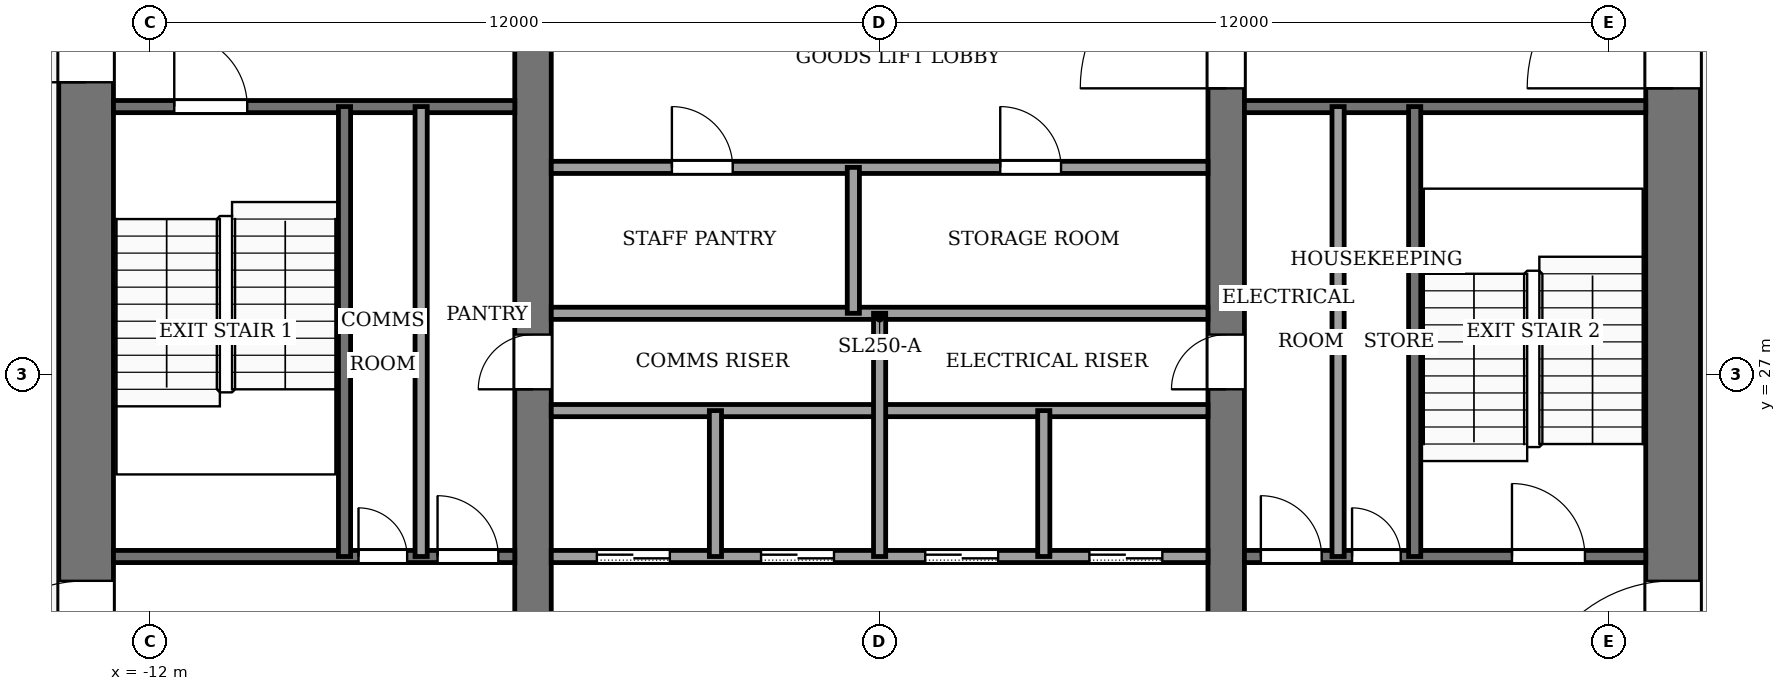
"""IFC4 building model, lengths in metres.
Left out: names, types, materials, properties, quantities, classifications, styles, units other than length and angle.
Written with IfcOpenShell. Run it as: python <this file> out.ifc"""

import sys

from ifc_helpers import new_model, si_unit, direction, frame, frame_2d, origin, place, context, subcontext, project, spatial, rectangle, extrude, element, fill, save


model = new_model("IFC4")
c1 = context("Model", 3, precision=1e-05, world=origin(), true_north=direction((0.0, 1.0)))
c2 = subcontext(c1, "Body", "Model", "MODEL_VIEW")
j1 = project(units=[si_unit("LENGTHUNIT", "METRE"), si_unit("PLANEANGLEUNIT", "RADIAN")], contexts=[c1])
p1 = place(None, origin())
s1 = spatial("IfcSite", under=j1, at=p1, CompositionType="ELEMENT")
p2 = place(p1, origin())
s2 = spatial("IfcBuilding", under=s1, at=p2, CompositionType="ELEMENT")
p3 = place(p2, frame((0.0, 0.0, 202.0)))
s3 = spatial("IfcBuildingStorey", under=s2, at=p3, CompositionType="ELEMENT", Elevation=202.0)
p4 = place(p3, frame((-13.05, 18.4, -0.13), z_axis=(0.0, 0.0, 1.0), x_axis=(0.0, 1.0, 0.0)))
e1 = element("IfcWall", 1, at=p4, inside=s3, PredefinedType="SHEAR", context=c2, shape_type="SweptSolid", body=[
    extrude(rectangle(XDim=19.2, YDim=0.9, at=frame_2d((9.6, 0.0))), origin(), (0.0, 0.0, 1.0), 4.0),
])
p5 = place(p4, frame((2.8, 0.0, 0.13)))
e2 = element("IfcOpeningElement", 2, at=p5, cuts=e1, PredefinedType="OPENING", context=c2, shape_type="SweptSolid", body=[
    extrude(rectangle(XDim=2.4, YDim=2.4, at=frame_2d((1.2, 1.2))), frame((0.0, 0.46, 0.0), z_axis=(0.0, -1.0, 0.0), x_axis=(1.0, 0.0, 0.0)), (0.0, 0.0, 1.0), 0.92),
])
p6 = place(p4, frame((13.4, 0.0, 0.13)))
e3 = element("IfcOpeningElement", 3, at=p6, cuts=e1, PredefinedType="OPENING", context=c2, shape_type="SweptSolid", body=[
    extrude(rectangle(XDim=1.4, YDim=2.2, at=frame_2d((0.7, 1.1))), frame((0.0, 0.46, 0.0), z_axis=(0.0, -1.0, 0.0), x_axis=(1.0, 0.0, 0.0)), (0.0, 0.0, 1.0), 0.92),
])
p7 = place(p3, frame((13.05, 18.4, -0.13), z_axis=(0.0, 0.0, 1.0), x_axis=(0.0, 1.0, 0.0)))
e4 = element("IfcWall", 4, at=p7, inside=s3, PredefinedType="SHEAR", context=c2, shape_type="SweptSolid", body=[
    extrude(rectangle(XDim=19.2, YDim=0.9, at=frame_2d((9.6, 0.0))), origin(), (0.0, 0.0, 1.0), 4.0),
])
p8 = place(p7, frame((2.8, 0.0, 0.13)))
e5 = element("IfcOpeningElement", 5, at=p8, cuts=e4, PredefinedType="OPENING", context=c2, shape_type="SweptSolid", body=[
    extrude(rectangle(XDim=2.4, YDim=2.4, at=frame_2d((1.2, 1.2))), frame((0.0, 0.46, 0.0), z_axis=(0.0, -1.0, 0.0), x_axis=(1.0, 0.0, 0.0)), (0.0, 0.0, 1.0), 0.92),
])
p9 = place(p7, frame((13.3, 0.0, 0.13)))
e6 = element("IfcOpeningElement", 6, at=p9, cuts=e4, PredefinedType="OPENING", context=c2, shape_type="SweptSolid", body=[
    extrude(rectangle(XDim=2.4, YDim=2.4, at=frame_2d((1.2, 1.2))), frame((0.0, 0.46, 0.0), z_axis=(0.0, -1.0, 0.0), x_axis=(1.0, 0.0, 0.0)), (0.0, 0.0, 1.0), 0.92),
])
p10 = place(p3, frame((-5.7, 18.4, -0.13), z_axis=(0.0, 0.0, 1.0), x_axis=(0.0, 1.0, 0.0)))
e7 = element("IfcWall", 7, at=p10, inside=s3, PredefinedType="SHEAR", context=c2, shape_type="SweptSolid", body=[
    extrude(rectangle(XDim=19.2, YDim=0.6, at=frame_2d((9.6, 0.0))), origin(), (0.0, 0.0, 1.0), 4.0),
])
p11 = place(p10, frame((8.35, 0.0, 0.13)))
e8 = element("IfcOpeningElement", 8, at=p11, cuts=e7, PredefinedType="OPENING", context=c2, shape_type="SweptSolid", body=[
    extrude(rectangle(XDim=0.9, YDim=2.1, at=frame_2d((0.45, 1.05))), frame((0.0, 0.31, 0.0), z_axis=(0.0, -1.0, 0.0), x_axis=(1.0, 0.0, 0.0)), (0.0, 0.0, 1.0), 0.62),
])
p12 = place(p3, frame((5.7, 18.4, -0.13), z_axis=(0.0, 0.0, 1.0), x_axis=(0.0, 1.0, 0.0)))
e9 = element("IfcWall", 9, at=p12, inside=s3, PredefinedType="SHEAR", context=c2, shape_type="SweptSolid", body=[
    extrude(rectangle(XDim=19.2, YDim=0.6, at=frame_2d((9.6, 0.0))), origin(), (0.0, 0.0, 1.0), 4.0),
])
p13 = place(p12, frame((8.35, 0.0, 0.13)))
e10 = element("IfcOpeningElement", 10, at=p13, cuts=e9, PredefinedType="OPENING", context=c2, shape_type="SweptSolid", body=[
    extrude(rectangle(XDim=0.9, YDim=2.1, at=frame_2d((0.45, 1.05))), frame((0.0, 0.31, 0.0), z_axis=(0.0, -1.0, 0.0), x_axis=(1.0, 0.0, 0.0)), (0.0, 0.0, 1.0), 0.62),
])
p14 = place(p12, frame((13.3, 0.0, 0.13)))
e11 = element("IfcOpeningElement", 11, at=p14, cuts=e9, PredefinedType="OPENING", context=c2, shape_type="SweptSolid", body=[
    extrude(rectangle(XDim=2.4, YDim=2.4, at=frame_2d((1.2, 1.2))), frame((0.0, 0.31, 0.0), z_axis=(0.0, -1.0, 0.0), x_axis=(1.0, 0.0, 0.0)), (0.0, 0.0, 1.0), 0.62),
])
p15 = place(p3, frame((-12.6, 24.0, 0.0), z_axis=(0.0, 0.0, 1.0), x_axis=(1.0, 0.0, 0.0)))
e12 = element("IfcWall", 12, at=p15, inside=s3, PredefinedType="PARTITIONING", context=c2, shape_type="SweptSolid", body=[
    extrude(rectangle(XDim=6.6, YDim=0.2, at=frame_2d((3.3, 0.0))), origin(), (0.0, 0.0, 1.0), 3.87),
])
p16 = place(p15, frame((4.03, 0.0, 0.0)))
e13 = element("IfcOpeningElement", 13, at=p16, cuts=e12, PredefinedType="OPENING", context=c2, shape_type="SweptSolid", body=[
    extrude(rectangle(XDim=0.8, YDim=2.1, at=frame_2d((0.4, 1.05))), frame((0.0, 0.11, 0.0), z_axis=(0.0, -1.0, 0.0), x_axis=(1.0, 0.0, 0.0)), (0.0, 0.0, 1.0), 0.22),
])
p17 = place(p15, frame((5.33, 0.0, 0.0)))
e14 = element("IfcOpeningElement", 14, at=p17, cuts=e12, PredefinedType="OPENING", context=c2, shape_type="SweptSolid", body=[
    extrude(rectangle(XDim=1.0, YDim=2.1, at=frame_2d((0.5, 1.05))), frame((0.0, 0.11, 0.0), z_axis=(0.0, -1.0, 0.0), x_axis=(1.0, 0.0, 0.0)), (0.0, 0.0, 1.0), 0.22),
])
p18 = place(p3, frame((-5.4, 24.0, 0.0), z_axis=(0.0, 0.0, 1.0), x_axis=(1.0, 0.0, 0.0)))
e15 = element("IfcWall", 15, at=p18, inside=s3, PredefinedType="PARTITIONING", context=c2, shape_type="SweptSolid", body=[
    extrude(rectangle(XDim=10.8, YDim=0.2, at=frame_2d((5.4, 0.0))), origin(), (0.0, 0.0, 1.0), 3.87),
])
p19 = place(p18, frame((0.75, 0.0, 0.0)))
e16 = element("IfcOpeningElement", 16, at=p19, cuts=e15, PredefinedType="OPENING", context=c2, shape_type="SweptSolid", body=[
    extrude(rectangle(XDim=1.2, YDim=2.2, at=frame_2d((0.6, 1.1))), frame((0.0, 0.11, 0.0), z_axis=(0.0, -1.0, 0.0), x_axis=(1.0, 0.0, 0.0)), (0.0, 0.0, 1.0), 0.22),
])
p20 = place(p18, frame((3.45, 0.0, 0.0)))
e17 = element("IfcOpeningElement", 17, at=p20, cuts=e15, PredefinedType="OPENING", context=c2, shape_type="SweptSolid", body=[
    extrude(rectangle(XDim=1.2, YDim=2.2, at=frame_2d((0.6, 1.1))), frame((0.0, 0.11, 0.0), z_axis=(0.0, -1.0, 0.0), x_axis=(1.0, 0.0, 0.0)), (0.0, 0.0, 1.0), 0.22),
])
p21 = place(p18, frame((6.15, 0.0, 0.0)))
e18 = element("IfcOpeningElement", 18, at=p21, cuts=e15, PredefinedType="OPENING", context=c2, shape_type="SweptSolid", body=[
    extrude(rectangle(XDim=1.2, YDim=2.2, at=frame_2d((0.6, 1.1))), frame((0.0, 0.11, 0.0), z_axis=(0.0, -1.0, 0.0), x_axis=(1.0, 0.0, 0.0)), (0.0, 0.0, 1.0), 0.22),
])
p22 = place(p18, frame((8.85, 0.0, 0.0)))
e19 = element("IfcOpeningElement", 19, at=p22, cuts=e15, PredefinedType="OPENING", context=c2, shape_type="SweptSolid", body=[
    extrude(rectangle(XDim=1.2, YDim=2.2, at=frame_2d((0.6, 1.1))), frame((0.0, 0.11, 0.0), z_axis=(0.0, -1.0, 0.0), x_axis=(1.0, 0.0, 0.0)), (0.0, 0.0, 1.0), 0.22),
])
p23 = place(p3, frame((6.0, 24.0, 0.0), z_axis=(0.0, 0.0, 1.0), x_axis=(1.0, 0.0, 0.0)))
e20 = element("IfcWall", 20, at=p23, inside=s3, PredefinedType="PARTITIONING", context=c2, shape_type="SweptSolid", body=[
    extrude(rectangle(XDim=6.6, YDim=0.2, at=frame_2d((3.3, 0.0))), origin(), (0.0, 0.0, 1.0), 3.87),
])
p24 = place(p23, frame((0.27, 0.0, 0.0)))
e21 = element("IfcOpeningElement", 21, at=p24, cuts=e20, PredefinedType="OPENING", context=c2, shape_type="SweptSolid", body=[
    extrude(rectangle(XDim=1.0, YDim=2.1, at=frame_2d((0.5, 1.05))), frame((0.0, 0.11, 0.0), z_axis=(0.0, -1.0, 0.0), x_axis=(1.0, 0.0, 0.0)), (0.0, 0.0, 1.0), 0.22),
])
p25 = place(p23, frame((1.77, 0.0, 0.0)))
e22 = element("IfcOpeningElement", 22, at=p25, cuts=e20, PredefinedType="OPENING", context=c2, shape_type="SweptSolid", body=[
    extrude(rectangle(XDim=0.8, YDim=2.1, at=frame_2d((0.4, 1.05))), frame((0.0, 0.11, 0.0), z_axis=(0.0, -1.0, 0.0), x_axis=(1.0, 0.0, 0.0)), (0.0, 0.0, 1.0), 0.22),
])
p26 = place(p23, frame((4.4, 0.0, 0.0)))
e23 = element("IfcOpeningElement", 23, at=p26, cuts=e20, PredefinedType="OPENING", context=c2, shape_type="SweptSolid", body=[
    extrude(rectangle(XDim=1.2, YDim=2.2, at=frame_2d((0.6, 1.1))), frame((0.0, 0.11, 0.0), z_axis=(0.0, -1.0, 0.0), x_axis=(1.0, 0.0, 0.0)), (0.0, 0.0, 1.0), 0.22),
])
for number, where, z_axis, x_axis in (
    (24, (-5.4, 26.4, 0.0), (0.0, 0.0, 1.0), (1.0, 0.0, 0.0)),
    (25, (-5.4, 28.0, 0.0), (0.0, 0.0, 1.0), (1.0, 0.0, 0.0)),
):
    element("IfcWall", number, at=place(p3, frame(where, z_axis=z_axis, x_axis=x_axis)), inside=s3, PredefinedType="PARTITIONING", context=c2, shape_type="SweptSolid", body=[
        extrude(rectangle(XDim=10.8, YDim=0.2, at=frame_2d((5.4, 0.0))), origin(), (0.0, 0.0, 1.0), 3.87),
    ])
p27 = place(p3, frame((-5.4, 30.4, 0.0), z_axis=(0.0, 0.0, 1.0), x_axis=(1.0, 0.0, 0.0)))
e26 = element("IfcWall", 26, at=p27, inside=s3, PredefinedType="PARTITIONING", context=c2, shape_type="SweptSolid", body=[
    extrude(rectangle(XDim=10.8, YDim=0.2, at=frame_2d((5.4, 0.0))), origin(), (0.0, 0.0, 1.0), 3.87),
])
p28 = place(p27, frame((1.984, 0.0, 0.0)))
e27 = element("IfcOpeningElement", 27, at=p28, cuts=e26, PredefinedType="OPENING", context=c2, shape_type="SweptSolid", body=[
    extrude(rectangle(XDim=1.0, YDim=2.1, at=frame_2d((0.5, 1.05))), frame((0.0, 0.11, 0.0), z_axis=(0.0, -1.0, 0.0), x_axis=(1.0, 0.0, 0.0)), (0.0, 0.0, 1.0), 0.22),
])
p29 = place(p27, frame((7.384, 0.0, 0.0)))
e28 = element("IfcOpeningElement", 28, at=p29, cuts=e26, PredefinedType="OPENING", context=c2, shape_type="SweptSolid", body=[
    extrude(rectangle(XDim=1.0, YDim=2.1, at=frame_2d((0.5, 1.05))), frame((0.0, 0.11, 0.0), z_axis=(0.0, -1.0, 0.0), x_axis=(1.0, 0.0, 0.0)), (0.0, 0.0, 1.0), 0.22),
])
p30 = place(p3, frame((-12.6, 31.4, 0.0), z_axis=(0.0, 0.0, 1.0), x_axis=(1.0, 0.0, 0.0)))
e29 = element("IfcWall", 29, at=p30, inside=s3, PredefinedType="PARTITIONING", context=c2, shape_type="SweptSolid", body=[
    extrude(rectangle(XDim=6.6, YDim=0.2, at=frame_2d((3.3, 0.0))), origin(), (0.0, 0.0, 1.0), 3.87),
])
p31 = place(p30, frame((1.0, 0.0, 0.0)))
e30 = element("IfcOpeningElement", 30, at=p31, cuts=e29, PredefinedType="OPENING", context=c2, shape_type="SweptSolid", body=[
    extrude(rectangle(XDim=1.2, YDim=2.2, at=frame_2d((0.6, 1.1))), frame((0.0, 0.11, 0.0), z_axis=(0.0, -1.0, 0.0), x_axis=(1.0, 0.0, 0.0)), (0.0, 0.0, 1.0), 0.22),
])
p32 = place(p3, frame((6.0, 31.4, 0.0), z_axis=(0.0, 0.0, 1.0), x_axis=(1.0, 0.0, 0.0)))
e31 = element("IfcWall", 31, at=p32, inside=s3, PredefinedType="PARTITIONING", context=c2, shape_type="SweptSolid", body=[
    extrude(rectangle(XDim=6.6, YDim=0.2, at=frame_2d((3.3, 0.0))), origin(), (0.0, 0.0, 1.0), 3.87),
])
for number, where, z_axis, x_axis in (
    (32, (-8.8, 24.0, 0.0), (0.0, 0.0, 1.0), (0.0, 1.0, 0.0)),
    (33, (-7.54, 24.0, 0.0), (0.0, 0.0, 1.0), (0.0, 1.0, 0.0)),
):
    element("IfcWall", number, at=place(p3, frame(where, z_axis=z_axis, x_axis=x_axis)), inside=s3, PredefinedType="PARTITIONING", context=c2, shape_type="SweptSolid", body=[
        extrude(rectangle(XDim=7.4, YDim=0.2, at=frame_2d((3.7, 0.0))), origin(), (0.0, 0.0, 1.0), 3.87),
    ])
for number, where, z_axis, x_axis in (
    (34, (-2.7, 24.0, 0.0), (0.0, 0.0, 1.0), (0.0, 1.0, 0.0)),
    (35, (-0.432, 28.0, 0.0), (0.0, 0.0, 1.0), (0.0, 1.0, 0.0)),
):
    element("IfcWall", number, at=place(p3, frame(where, z_axis=z_axis, x_axis=x_axis)), inside=s3, PredefinedType="PARTITIONING", context=c2, shape_type="SweptSolid", body=[
        extrude(rectangle(XDim=2.4, YDim=0.2, at=frame_2d((1.2, 0.0))), origin(), (0.0, 0.0, 1.0), 3.87),
    ])
p33 = place(p3, frame((0.0, 24.0, 0.0), z_axis=(0.0, 0.0, 1.0), x_axis=(0.0, 1.0, 0.0)))
e36 = element("IfcWall", 36, at=p33, inside=s3, PredefinedType="PARTITIONING", context=c2, shape_type="SweptSolid", body=[
    extrude(rectangle(XDim=4.0, YDim=0.2, at=frame_2d((2.0, 0.0))), origin(), (0.0, 0.0, 1.0), 3.87),
])
p34 = place(p3, frame((2.7, 24.0, 0.0), z_axis=(0.0, 0.0, 1.0), x_axis=(0.0, 1.0, 0.0)))
e37 = element("IfcWall", 37, at=p34, inside=s3, PredefinedType="PARTITIONING", context=c2, shape_type="SweptSolid", body=[
    extrude(rectangle(XDim=2.4, YDim=0.2, at=frame_2d((1.2, 0.0))), origin(), (0.0, 0.0, 1.0), 3.87),
])
for number, where, z_axis, x_axis in (
    (38, (7.54, 24.0, 0.0), (0.0, 0.0, 1.0), (0.0, 1.0, 0.0)),
    (39, (8.8, 24.0, 0.0), (0.0, 0.0, 1.0), (0.0, 1.0, 0.0)),
):
    element("IfcWall", number, at=place(p3, frame(where, z_axis=z_axis, x_axis=x_axis)), inside=s3, PredefinedType="PARTITIONING", context=c2, shape_type="SweptSolid", body=[
        extrude(rectangle(XDim=7.4, YDim=0.2, at=frame_2d((3.7, 0.0))), origin(), (0.0, 0.0, 1.0), 3.87),
    ])
p35 = place(p19, origin())
e40 = element("IfcDoor", 40, at=p35, inside=s3, OperationType="SLIDING_TO_LEFT", PredefinedType="DOOR", context=c2, shape_type="SweptSolid", body=[
    extrude(rectangle(XDim=1.2, YDim=2.2, at=frame_2d((0.6, 1.1))), frame((0.0, 0.025, 0.0), z_axis=(0.0, -1.0, 0.0), x_axis=(1.0, 0.0, 0.0)), (0.0, 0.0, 1.0), 0.05),
])
fill(e16, e40)
p36 = place(p20, origin())
e41 = element("IfcDoor", 41, at=p36, inside=s3, OperationType="SLIDING_TO_LEFT", PredefinedType="DOOR", context=c2, shape_type="SweptSolid", body=[
    extrude(rectangle(XDim=1.2, YDim=2.2, at=frame_2d((0.6, 1.1))), frame((0.0, 0.025, 0.0), z_axis=(0.0, -1.0, 0.0), x_axis=(1.0, 0.0, 0.0)), (0.0, 0.0, 1.0), 0.05),
])
fill(e17, e41)
p37 = place(p21, origin())
e42 = element("IfcDoor", 42, at=p37, inside=s3, OperationType="SLIDING_TO_LEFT", PredefinedType="DOOR", context=c2, shape_type="SweptSolid", body=[
    extrude(rectangle(XDim=1.2, YDim=2.2, at=frame_2d((0.6, 1.1))), frame((0.0, 0.025, 0.0), z_axis=(0.0, -1.0, 0.0), x_axis=(1.0, 0.0, 0.0)), (0.0, 0.0, 1.0), 0.05),
])
fill(e18, e42)
p38 = place(p22, origin())
e43 = element("IfcDoor", 43, at=p38, inside=s3, OperationType="SLIDING_TO_LEFT", PredefinedType="DOOR", context=c2, shape_type="SweptSolid", body=[
    extrude(rectangle(XDim=1.2, YDim=2.2, at=frame_2d((0.6, 1.1))), frame((0.0, 0.025, 0.0), z_axis=(0.0, -1.0, 0.0), x_axis=(1.0, 0.0, 0.0)), (0.0, 0.0, 1.0), 0.05),
])
fill(e19, e43)
p39 = place(p28, origin())
e44 = element("IfcDoor", 44, at=p39, inside=s3, OperationType="SINGLE_SWING_LEFT", PredefinedType="DOOR", context=c2, shape_type="SweptSolid", body=[
    extrude(rectangle(XDim=1.0, YDim=2.1, at=frame_2d((0.5, 1.05))), frame((0.0, 0.025, 0.0), z_axis=(0.0, -1.0, 0.0), x_axis=(1.0, 0.0, 0.0)), (0.0, 0.0, 1.0), 0.05),
])
fill(e27, e44)
p40 = place(p29, origin())
e45 = element("IfcDoor", 45, at=p40, inside=s3, OperationType="SINGLE_SWING_RIGHT", PredefinedType="DOOR", context=c2, shape_type="SweptSolid", body=[
    extrude(rectangle(XDim=1.0, YDim=2.1, at=frame_2d((0.5, 1.05))), frame((0.0, 0.025, 0.0), z_axis=(0.0, -1.0, 0.0), x_axis=(1.0, 0.0, 0.0)), (0.0, 0.0, 1.0), 0.05),
])
fill(e28, e45)
p41 = place(p16, origin())
e46 = element("IfcDoor", 46, at=p41, inside=s3, OperationType="SINGLE_SWING_RIGHT", PredefinedType="DOOR", context=c2, shape_type="SweptSolid", body=[
    extrude(rectangle(XDim=0.8, YDim=2.1, at=frame_2d((0.4, 1.05))), frame((0.0, 0.025, 0.0), z_axis=(0.0, -1.0, 0.0), x_axis=(1.0, 0.0, 0.0)), (0.0, 0.0, 1.0), 0.05),
])
fill(e13, e46)
p42 = place(p17, origin())
e47 = element("IfcDoor", 47, at=p42, inside=s3, OperationType="SINGLE_SWING_LEFT", PredefinedType="DOOR", context=c2, shape_type="SweptSolid", body=[
    extrude(rectangle(XDim=1.0, YDim=2.1, at=frame_2d((0.5, 1.05))), frame((0.0, 0.025, 0.0), z_axis=(0.0, -1.0, 0.0), x_axis=(1.0, 0.0, 0.0)), (0.0, 0.0, 1.0), 0.05),
])
fill(e14, e47)
p43 = place(p24, origin())
e48 = element("IfcDoor", 48, at=p43, inside=s3, OperationType="SINGLE_SWING_RIGHT", PredefinedType="DOOR", context=c2, shape_type="SweptSolid", body=[
    extrude(rectangle(XDim=1.0, YDim=2.1, at=frame_2d((0.5, 1.05))), frame((0.0, 0.025, 0.0), z_axis=(0.0, -1.0, 0.0), x_axis=(1.0, 0.0, 0.0)), (0.0, 0.0, 1.0), 0.05),
])
fill(e21, e48)
p44 = place(p25, origin())
e49 = element("IfcDoor", 49, at=p44, inside=s3, OperationType="SINGLE_SWING_LEFT", PredefinedType="DOOR", context=c2, shape_type="SweptSolid", body=[
    extrude(rectangle(XDim=0.8, YDim=2.1, at=frame_2d((0.4, 1.05))), frame((0.0, 0.025, 0.0), z_axis=(0.0, -1.0, 0.0), x_axis=(1.0, 0.0, 0.0)), (0.0, 0.0, 1.0), 0.05),
])
fill(e22, e49)
p45 = place(p11, origin())
e50 = element("IfcDoor", 50, at=p45, inside=s3, OperationType="SINGLE_SWING_RIGHT", PredefinedType="DOOR", context=c2, shape_type="SweptSolid", body=[
    extrude(rectangle(XDim=0.9, YDim=2.1, at=frame_2d((0.45, 1.05))), frame((0.0, 0.025, 0.0), z_axis=(0.0, -1.0, 0.0), x_axis=(1.0, 0.0, 0.0)), (0.0, 0.0, 1.0), 0.05),
])
fill(e8, e50)
p46 = place(p13, origin())
e51 = element("IfcDoor", 51, at=p46, inside=s3, OperationType="SINGLE_SWING_LEFT", PredefinedType="DOOR", context=c2, shape_type="SweptSolid", body=[
    extrude(rectangle(XDim=0.9, YDim=2.1, at=frame_2d((0.45, 1.05))), frame((0.0, 0.025, 0.0), z_axis=(0.0, -1.0, 0.0), x_axis=(1.0, 0.0, 0.0)), (0.0, 0.0, 1.0), 0.05),
])
fill(e10, e51)
p47 = place(p31, origin())
e52 = element("IfcDoor", 52, at=p47, inside=s3, OperationType="SINGLE_SWING_LEFT", PredefinedType="DOOR", context=c2, shape_type="SweptSolid", body=[
    extrude(rectangle(XDim=1.2, YDim=2.2, at=frame_2d((0.6, 1.1))), frame((0.0, 0.025, 0.0), z_axis=(0.0, -1.0, 0.0), x_axis=(1.0, 0.0, 0.0)), (0.0, 0.0, 1.0), 0.05),
])
fill(e30, e52)
p48 = place(p26, origin())
e53 = element("IfcDoor", 53, at=p48, inside=s3, OperationType="SINGLE_SWING_RIGHT", PredefinedType="DOOR", context=c2, shape_type="SweptSolid", body=[
    extrude(rectangle(XDim=1.2, YDim=2.2, at=frame_2d((0.6, 1.1))), frame((0.0, 0.025, 0.0), z_axis=(0.0, -1.0, 0.0), x_axis=(1.0, 0.0, 0.0)), (0.0, 0.0, 1.0), 0.05),
])
fill(e23, e53)
p49 = place(p14, origin())
e54 = element("IfcDoor", 54, at=p49, inside=s3, OperationType="DOUBLE_DOOR_SINGLE_SWING", PredefinedType="DOOR", context=c2, shape_type="SweptSolid", body=[
    extrude(rectangle(XDim=2.4, YDim=2.4, at=frame_2d((1.2, 1.2))), frame((0.0, 0.025, 0.0), z_axis=(0.0, -1.0, 0.0), x_axis=(1.0, 0.0, 0.0)), (0.0, 0.0, 1.0), 0.05),
])
fill(e11, e54)
p50 = place(p5, origin())
e55 = element("IfcDoor", 55, at=p50, inside=s3, OperationType="DOUBLE_DOOR_SINGLE_SWING", PredefinedType="DOOR", context=c2, shape_type="SweptSolid", body=[
    extrude(rectangle(XDim=2.4, YDim=2.4, at=frame_2d((1.2, 1.2))), frame((0.0, 0.025, 0.0), z_axis=(0.0, -1.0, 0.0), x_axis=(1.0, 0.0, 0.0)), (0.0, 0.0, 1.0), 0.05),
])
fill(e2, e55)
p51 = place(p8, origin())
e56 = element("IfcDoor", 56, at=p51, inside=s3, OperationType="DOUBLE_DOOR_SINGLE_SWING", PredefinedType="DOOR", context=c2, shape_type="SweptSolid", body=[
    extrude(rectangle(XDim=2.4, YDim=2.4, at=frame_2d((1.2, 1.2))), frame((0.0, 0.025, 0.0), z_axis=(0.0, -1.0, 0.0), x_axis=(1.0, 0.0, 0.0)), (0.0, 0.0, 1.0), 0.05),
])
fill(e5, e56)
p52 = place(p9, origin())
e57 = element("IfcDoor", 57, at=p52, inside=s3, OperationType="DOUBLE_DOOR_SINGLE_SWING", PredefinedType="DOOR", context=c2, shape_type="SweptSolid", body=[
    extrude(rectangle(XDim=2.4, YDim=2.4, at=frame_2d((1.2, 1.2))), frame((0.0, 0.025, 0.0), z_axis=(0.0, -1.0, 0.0), x_axis=(1.0, 0.0, 0.0)), (0.0, 0.0, 1.0), 0.05),
])
fill(e6, e57)
p53 = place(p6, origin())
e58 = element("IfcDoor", 58, at=p53, inside=s3, OperationType="SINGLE_SWING_LEFT", PredefinedType="DOOR", context=c2, shape_type="SweptSolid", body=[
    extrude(rectangle(XDim=1.4, YDim=2.2, at=frame_2d((0.7, 1.1))), frame((0.0, 0.025, 0.0), z_axis=(0.0, -1.0, 0.0), x_axis=(1.0, 0.0, 0.0)), (0.0, 0.0, 1.0), 0.05),
])
fill(e3, e58)
save(model, sys.argv[1])
